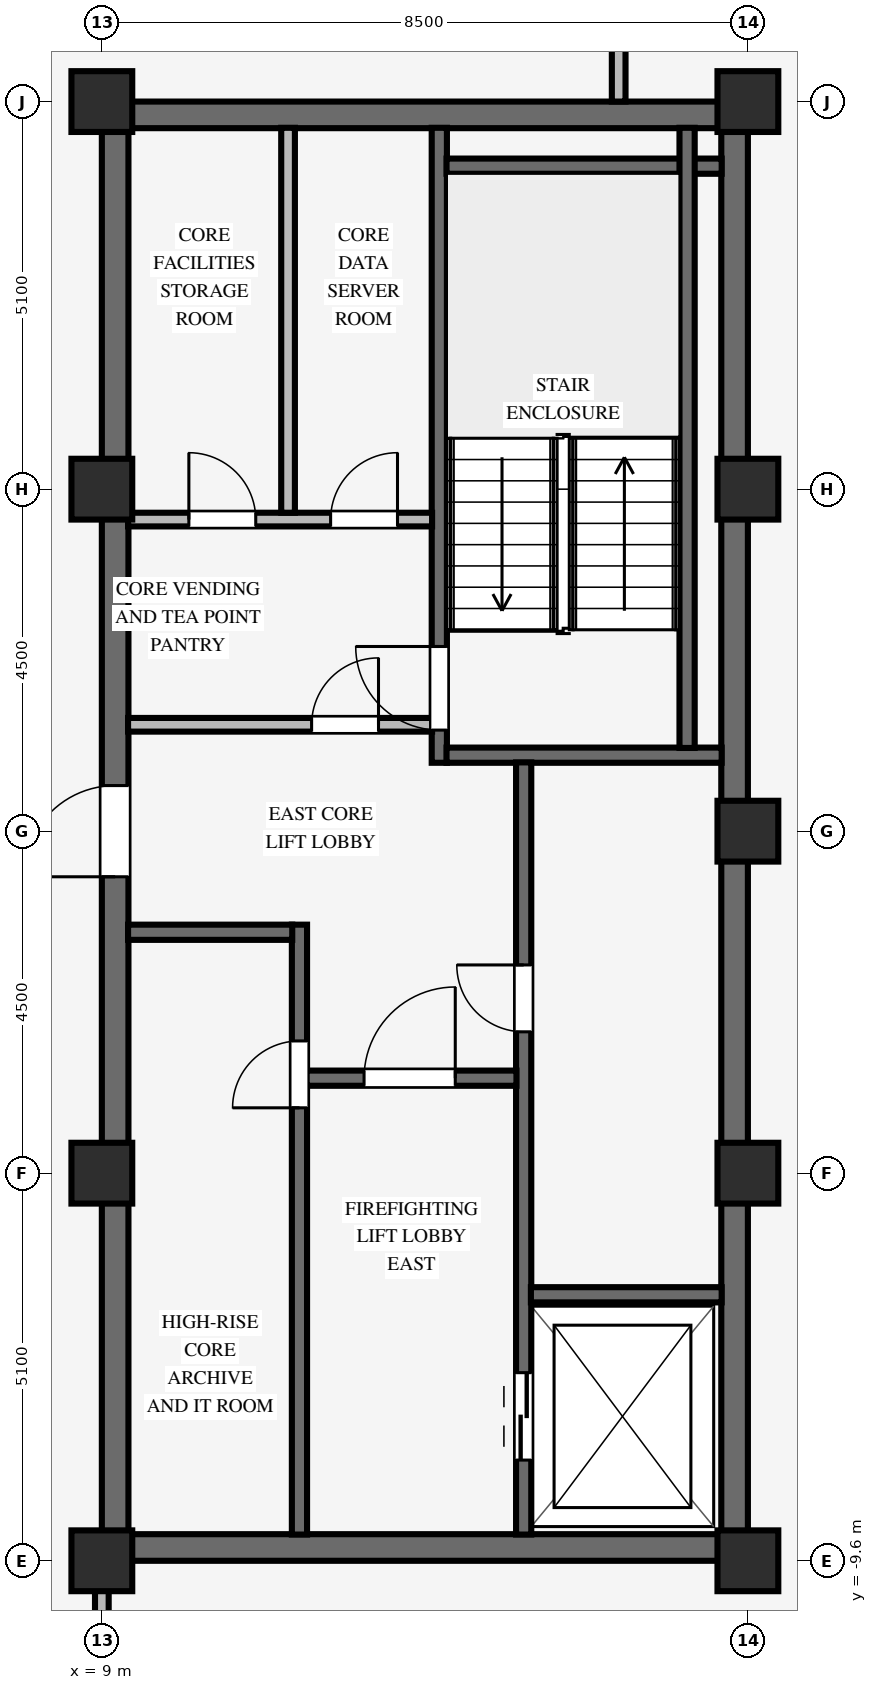
"""IFC4 building model, lengths in metres.
Left out: names, types, materials, properties, quantities, classifications, styles, units other than length and angle.
Written with IfcOpenShell. Run it as: python <this file> out.ifc"""

import sys

from ifc_helpers import new_model, si_unit, direction, frame, frame_2d, origin, origin_2d, place, context, subcontext, project, spatial, rectangle, extrude, source, transform, mapped, element, fill, save


model = new_model("IFC4")
c1 = context("Model", 3, precision=1e-05, world=origin(), true_north=direction((0.0, 1.0)))
c2 = subcontext(c1, "Body", "Model", "MODEL_VIEW")
j1 = project(units=[si_unit("LENGTHUNIT", "METRE"), si_unit("PLANEANGLEUNIT", "RADIAN")], contexts=[c1])
p1 = place(None, origin())
s1 = spatial("IfcSite", under=j1, at=p1, CompositionType="ELEMENT")
p2 = place(p1, origin())
s2 = spatial("IfcBuilding", under=s1, at=p2, CompositionType="ELEMENT")
p3 = place(p2, frame((0.0, 0.0, 283.5)))
s3 = spatial("IfcBuildingStorey", under=s2, at=p3, CompositionType="ELEMENT", Elevation=283.5)
for number, where, z_axis, x_axis in (
    (1, (9.0, -9.425, 0.0), (0.0, 0.0, 1.0), (1.0, 0.0, 0.0)),
    (2, (9.0, 9.425, 0.0), (0.0, 0.0, 1.0), (1.0, 0.0, 0.0)),
):
    element("IfcWall", number, at=place(p3, frame(where, z_axis=z_axis, x_axis=x_axis)), inside=s3, PredefinedType="SHEAR", context=c2, shape_type="SweptSolid", body=[
        extrude(rectangle(XDim=8.5, YDim=0.35, at=frame_2d((4.25, 0.0))), origin(), (0.0, 0.0, 1.0), 3.25),
    ])
p4 = place(p3, frame((9.175, -9.255, 0.0), z_axis=(0.0, 0.0, 1.0), x_axis=(0.0, 1.0, 0.0)))
e3 = element("IfcWall", 3, at=p4, inside=s3, PredefinedType="SHEAR", context=c2, shape_type="SweptSolid", body=[
    extrude(rectangle(XDim=18.51, YDim=0.35, at=frame_2d((9.255, 0.0))), origin(), (0.0, 0.0, 1.0), 3.25),
])
p5 = place(p4, frame((8.655, 0.0, 0.0)))
e4 = element("IfcOpeningElement", 4, at=p5, cuts=e3, PredefinedType="OPENING", context=c2, shape_type="SweptSolid", body=[
    extrude(rectangle(XDim=1.2, YDim=2.15, at=frame_2d((0.6, 1.075))), frame((0.0, 0.185, 0.0), z_axis=(0.0, -1.0, 0.0), x_axis=(1.0, 0.0, 0.0)), (0.0, 0.0, 1.0), 0.37),
])
p6 = place(p3, frame((17.325, -9.255, 0.0), z_axis=(0.0, 0.0, 1.0), x_axis=(0.0, 1.0, 0.0)))
e5 = element("IfcWall", 5, at=p6, inside=s3, PredefinedType="SHEAR", context=c2, shape_type="SweptSolid", body=[
    extrude(rectangle(XDim=18.51, YDim=0.35, at=frame_2d((9.255, 0.0))), origin(), (0.0, 0.0, 1.0), 3.25),
])
for number, where, z_axis, x_axis in (
    (6, (9.0, -9.6, 0.0), (0.0, 0.0, 1.0), (1.0, 0.0, 0.0)),
    (7, (9.0, -4.5, 0.0), (0.0, 0.0, 1.0), (1.0, 0.0, 0.0)),
    (8, (9.0, 4.5, 0.0), (0.0, 0.0, 1.0), (1.0, 0.0, 0.0)),
    (9, (9.0, 9.6, 0.0), (0.0, 0.0, 1.0), (1.0, 0.0, 0.0)),
    (10, (17.5, -9.6, 0.0), (0.0, 0.0, 1.0), (1.0, 0.0, 0.0)),
    (11, (17.5, -4.5, 0.0), (0.0, 0.0, 1.0), (1.0, 0.0, 0.0)),
    (12, (17.5, 4.5, 0.0), (0.0, 0.0, 1.0), (1.0, 0.0, 0.0)),
    (13, (17.5, 9.6, 0.0), (0.0, 0.0, 1.0), (1.0, 0.0, 0.0)),
    (14, (17.5, 0.0, 0.0), (0.0, 0.0, 1.0), (1.0, 0.0, 0.0)),
):
    element("IfcColumn", number, at=place(p3, frame(where, z_axis=z_axis, x_axis=x_axis)), inside=s3, PredefinedType="COLUMN", context=c2, shape_type="SweptSolid", body=[
        extrude(rectangle(XDim=0.8, YDim=0.8, at=origin_2d()), origin(), (0.0, 0.0, 1.0), 3.25),
    ])
p7 = place(p3, frame((13.44, 0.9, 0.0), z_axis=(0.0, 0.0, 1.0), x_axis=(0.0, 1.0, 0.0)))
e15 = element("IfcWall", 15, at=p7, inside=s3, PredefinedType="SHEAR", context=c2, shape_type="SweptSolid", body=[
    extrude(rectangle(XDim=8.355, YDim=0.2, at=frame_2d((4.177, 0.0))), origin(), (0.0, 0.0, 1.0), 3.25),
])
p8 = place(p7, frame((0.43, 0.0, 0.0)))
e16 = element("IfcOpeningElement", 16, at=p8, cuts=e15, PredefinedType="OPENING", context=c2, shape_type="SweptSolid", body=[
    extrude(rectangle(XDim=1.1, YDim=2.15, at=frame_2d((0.55, 1.075))), frame((0.0, 0.11, 0.0), z_axis=(0.0, -1.0, 0.0), x_axis=(1.0, 0.0, 0.0)), (0.0, 0.0, 1.0), 0.22),
])
for number, where, z_axis, x_axis in (
    (17, (13.535, 1.0, 0.0), (0.0, 0.0, 1.0), (1.0, 0.0, 0.0)),
    (18, (13.535, 8.75, 0.0), (0.0, 0.0, 1.0), (1.0, 0.0, 0.0)),
):
    element("IfcWall", number, at=place(p3, frame(where, z_axis=z_axis, x_axis=x_axis)), inside=s3, PredefinedType="SHEAR", context=c2, shape_type="SweptSolid", body=[
        extrude(rectangle(XDim=3.62, YDim=0.2, at=frame_2d((1.81, 0.0))), origin(), (0.0, 0.0, 1.0), 3.25),
    ])
p9 = place(p3, frame((16.7, 1.095, 0.0), z_axis=(0.0, 0.0, 1.0), x_axis=(0.0, 1.0, 0.0)))
e19 = element("IfcWall", 19, at=p9, inside=s3, PredefinedType="SHEAR", context=c2, shape_type="SweptSolid", body=[
    extrude(rectangle(XDim=8.16, YDim=0.2, at=frame_2d((4.08, 0.0))), origin(), (0.0, 0.0, 1.0), 3.25),
])
p10 = place(p3, frame((14.55, -9.255, 0.0), z_axis=(0.0, 0.0, 1.0), x_axis=(0.0, 1.0, 0.0)))
e20 = element("IfcWall", 20, at=p10, inside=s3, PredefinedType="SHEAR", context=c2, shape_type="SweptSolid", body=[
    extrude(rectangle(XDim=10.16, YDim=0.2, at=frame_2d((5.08, 0.0))), origin(), (0.0, 0.0, 1.0), 3.25),
])
p11 = place(p10, frame((6.615, 0.0, 0.0)))
e21 = element("IfcOpeningElement", 21, at=p11, cuts=e20, PredefinedType="OPENING", context=c2, shape_type="SweptSolid", body=[
    extrude(rectangle(XDim=0.88, YDim=2.1, at=frame_2d((0.44, 1.05))), frame((0.0, 0.11, 0.0), z_axis=(0.0, -1.0, 0.0), x_axis=(1.0, 0.0, 0.0)), (0.0, 0.0, 1.0), 0.22),
])
p12 = place(p10, frame((0.98, 0.0, 0.0)))
e22 = element("IfcOpeningElement", 22, at=p12, cuts=e20, PredefinedType="OPENING", context=c2, shape_type="SweptSolid", body=[
    extrude(rectangle(XDim=1.15, YDim=2.15, at=frame_2d((0.575, 1.075))), frame((0.0, 0.11, 0.0), z_axis=(0.0, -1.0, 0.0), x_axis=(1.0, 0.0, 0.0)), (0.0, 0.0, 1.0), 0.22),
])
p13 = place(p3, frame((14.645, -6.1, 0.0), z_axis=(0.0, 0.0, 1.0), x_axis=(1.0, 0.0, 0.0)))
e23 = element("IfcWall", 23, at=p13, inside=s3, PredefinedType="SHEAR", context=c2, shape_type="SweptSolid", body=[
    extrude(rectangle(XDim=2.51, YDim=0.2, at=frame_2d((1.255, 0.0))), origin(), (0.0, 0.0, 1.0), 3.25),
])
p14 = place(p3, frame((11.6, -9.255, 0.0), z_axis=(0.0, 0.0, 1.0), x_axis=(0.0, 1.0, 0.0)))
e24 = element("IfcWall", 24, at=p14, inside=s3, PredefinedType="SHEAR", context=c2, shape_type="SweptSolid", body=[
    extrude(rectangle(XDim=8.025, YDim=0.2, at=frame_2d((4.012, 0.0))), origin(), (0.0, 0.0, 1.0), 3.25),
])
p15 = place(p14, frame((5.615, 0.0, 0.0)))
e25 = element("IfcOpeningElement", 25, at=p15, cuts=e24, PredefinedType="OPENING", context=c2, shape_type="SweptSolid", body=[
    extrude(rectangle(XDim=0.88, YDim=2.1, at=frame_2d((0.44, 1.05))), frame((0.0, 0.11, 0.0), z_axis=(0.0, -1.0, 0.0), x_axis=(1.0, 0.0, 0.0)), (0.0, 0.0, 1.0), 0.22),
])
p16 = place(p3, frame((11.695, -3.25, 0.0), z_axis=(0.0, 0.0, 1.0), x_axis=(1.0, 0.0, 0.0)))
e26 = element("IfcWall", 26, at=p16, inside=s3, PredefinedType="SHEAR", context=c2, shape_type="SweptSolid", body=[
    extrude(rectangle(XDim=2.76, YDim=0.2, at=frame_2d((1.38, 0.0))), origin(), (0.0, 0.0, 1.0), 3.25),
])
p17 = place(p16, frame((0.755, 0.0, 0.0)))
e27 = element("IfcOpeningElement", 27, at=p17, cuts=e26, PredefinedType="OPENING", context=c2, shape_type="SweptSolid", body=[
    extrude(rectangle(XDim=1.2, YDim=2.15, at=frame_2d((0.6, 1.075))), frame((0.0, 0.11, 0.0), z_axis=(0.0, -1.0, 0.0), x_axis=(1.0, 0.0, 0.0)), (0.0, 0.0, 1.0), 0.22),
])
p18 = place(p3, frame((9.345, -1.33, 0.0), z_axis=(0.0, 0.0, 1.0), x_axis=(1.0, 0.0, 0.0)))
e28 = element("IfcWall", 28, at=p18, inside=s3, PredefinedType="SHEAR", context=c2, shape_type="SweptSolid", body=[
    extrude(rectangle(XDim=2.16, YDim=0.2, at=frame_2d((1.08, 0.0))), origin(), (0.0, 0.0, 1.0), 3.25),
])
p19 = place(p3, frame((9.345, 1.4, 0.0), z_axis=(0.0, 0.0, 1.0), x_axis=(1.0, 0.0, 0.0)))
e29 = element("IfcWall", 29, at=p19, inside=s3, PredefinedType="PARTITIONING", context=c2, shape_type="SweptSolid", body=[
    extrude(rectangle(XDim=4.0, YDim=0.18, at=frame_2d((2.0, 0.0))), origin(), (0.0, 0.0, 1.0), 3.24),
])
p20 = place(p19, frame((2.415, 0.0, 0.0)))
e30 = element("IfcOpeningElement", 30, at=p20, cuts=e29, PredefinedType="OPENING", context=c2, shape_type="SweptSolid", body=[
    extrude(rectangle(XDim=0.88, YDim=2.1, at=frame_2d((0.44, 1.05))), frame((0.0, 0.1, 0.0), z_axis=(0.0, -1.0, 0.0), x_axis=(1.0, 0.0, 0.0)), (0.0, 0.0, 1.0), 0.2),
])
p21 = place(p3, frame((9.345, 4.1, 0.0), z_axis=(0.0, 0.0, 1.0), x_axis=(1.0, 0.0, 0.0)))
e31 = element("IfcWall", 31, at=p21, inside=s3, PredefinedType="PARTITIONING", context=c2, shape_type="SweptSolid", body=[
    extrude(rectangle(XDim=4.0, YDim=0.18, at=frame_2d((2.0, 0.0))), origin(), (0.0, 0.0, 1.0), 3.24),
])
p22 = place(p21, frame((0.8, 0.0, 0.0)))
e32 = element("IfcOpeningElement", 32, at=p22, cuts=e31, PredefinedType="OPENING", context=c2, shape_type="SweptSolid", body=[
    extrude(rectangle(XDim=0.88, YDim=2.1, at=frame_2d((0.44, 1.05))), frame((0.0, 0.1, 0.0), z_axis=(0.0, -1.0, 0.0), x_axis=(1.0, 0.0, 0.0)), (0.0, 0.0, 1.0), 0.2),
])
p23 = place(p21, frame((2.665, 0.0, 0.0)))
e33 = element("IfcOpeningElement", 33, at=p23, cuts=e31, PredefinedType="OPENING", context=c2, shape_type="SweptSolid", body=[
    extrude(rectangle(XDim=0.88, YDim=2.1, at=frame_2d((0.44, 1.05))), frame((0.0, 0.1, 0.0), z_axis=(0.0, -1.0, 0.0), x_axis=(1.0, 0.0, 0.0)), (0.0, 0.0, 1.0), 0.2),
])
p24 = place(p3, frame((11.45, 4.19, 0.0), z_axis=(0.0, 0.0, 1.0), x_axis=(0.0, 1.0, 0.0)))
e34 = element("IfcWall", 34, at=p24, inside=s3, PredefinedType="PARTITIONING", context=c2, shape_type="SweptSolid", body=[
    extrude(rectangle(XDim=5.065, YDim=0.18, at=frame_2d((2.532, 0.0))), origin(), (0.0, 0.0, 1.0), 3.24),
])
p25 = place(p3, frame((9.0, -15.314, 0.0), z_axis=(0.0, 0.0, 1.0), x_axis=(0.0, 1.0, 0.0)))
e35 = element("IfcWall", 35, at=p25, inside=s3, PredefinedType="PARTITIONING", context=c2, shape_type="SweptSolid", body=[
    extrude(rectangle(XDim=5.318, YDim=0.18, at=frame_2d((2.659, 0.0))), origin(), (0.0, 0.0, 1.0), 2.772),
])
p26 = place(p25, frame((2.179, 0.0, 0.0)))
e36 = element("IfcOpeningElement", 36, at=p26, cuts=e35, PredefinedType="OPENING", context=c2, shape_type="SweptSolid", body=[
    extrude(rectangle(XDim=0.96, YDim=2.1, at=frame_2d((0.48, 1.05))), frame((0.0, 0.1, 0.0), z_axis=(0.0, -1.0, 0.0), x_axis=(1.0, 0.0, 0.0)), (0.0, 0.0, 1.0), 0.2),
])
p27 = place(p3, frame((15.8, 9.6, 0.0), z_axis=(0.0, 0.0, 1.0), x_axis=(0.0, 1.0, 0.0)))
e37 = element("IfcWall", 37, at=p27, inside=s3, PredefinedType="PARTITIONING", context=c2, shape_type="SweptSolid", body=[
    extrude(rectangle(XDim=2.514, YDim=0.18, at=frame_2d((1.257, 0.0))), origin(), (0.0, 0.0, 1.0), 3.24),
])
m1 = source(origin(), c2, "Body", "SweptSolid", [
    extrude(rectangle(XDim=1.1, YDim=2.15, at=frame_2d((0.55, 1.075))), frame((0.0, 0.025, 0.0), z_axis=(0.0, -1.0, 0.0), x_axis=(1.0, 0.0, 0.0)), (0.0, 0.0, 1.0), 0.05),
])
p28 = place(p8, origin())
e38 = element("IfcDoor", 38, at=p28, inside=s3, OperationType="SINGLE_SWING_RIGHT", PredefinedType="DOOR", context=c2, shape_type="MappedRepresentation", body=[
    mapped(m1, transform((0.0, 0.0, 0.0), scale=1.0)),
])
fill(e16, e38)
m2 = source(origin(), c2, "Body", "SweptSolid", [
    extrude(rectangle(XDim=0.88, YDim=2.1, at=frame_2d((0.44, 1.05))), frame((0.0, 0.025, 0.0), z_axis=(0.0, -1.0, 0.0), x_axis=(1.0, 0.0, 0.0)), (0.0, 0.0, 1.0), 0.05),
])
p29 = place(p11, origin())
e39 = element("IfcDoor", 39, at=p29, inside=s3, OperationType="SINGLE_SWING_RIGHT", PredefinedType="DOOR", context=c2, shape_type="MappedRepresentation", body=[
    mapped(m2, transform((0.0, 0.0, 0.0), scale=1.0)),
])
fill(e21, e39)
m3 = source(origin(), c2, "Body", "SweptSolid", [
    extrude(rectangle(XDim=1.2, YDim=2.15, at=frame_2d((0.6, 1.075))), frame((0.0, 0.025, 0.0), z_axis=(0.0, -1.0, 0.0), x_axis=(1.0, 0.0, 0.0)), (0.0, 0.0, 1.0), 0.05),
])
p30 = place(p17, origin())
e40 = element("IfcDoor", 40, at=p30, inside=s3, OperationType="SINGLE_SWING_RIGHT", PredefinedType="DOOR", context=c2, shape_type="MappedRepresentation", body=[
    mapped(m3, transform((0.0, 0.0, 0.0), scale=1.0)),
])
fill(e27, e40)
p31 = place(p15, origin())
e41 = element("IfcDoor", 41, at=p31, inside=s3, OperationType="SINGLE_SWING_LEFT", PredefinedType="DOOR", context=c2, shape_type="MappedRepresentation", body=[
    mapped(m2, transform((0.0, 0.0, 0.0), scale=1.0)),
])
fill(e25, e41)
p32 = place(p5, origin())
e42 = element("IfcDoor", 42, at=p32, inside=s3, OperationType="SINGLE_SWING_LEFT", PredefinedType="DOOR", context=c2, shape_type="MappedRepresentation", body=[
    mapped(m3, transform((0.0, 0.0, 0.0), scale=1.0)),
])
fill(e4, e42)
p33 = place(p20, origin())
e43 = element("IfcDoor", 43, at=p33, inside=s3, OperationType="SINGLE_SWING_RIGHT", PredefinedType="DOOR", context=c2, shape_type="MappedRepresentation", body=[
    mapped(m2, transform((0.0, 0.0, 0.0), scale=1.0)),
])
fill(e30, e43)
p34 = place(p22, origin())
e44 = element("IfcDoor", 44, at=p34, inside=s3, OperationType="SINGLE_SWING_LEFT", PredefinedType="DOOR", context=c2, shape_type="MappedRepresentation", body=[
    mapped(m2, transform((0.0, 0.0, 0.0), scale=1.0)),
])
fill(e32, e44)
p35 = place(p23, origin())
e45 = element("IfcDoor", 45, at=p35, inside=s3, OperationType="SINGLE_SWING_RIGHT", PredefinedType="DOOR", context=c2, shape_type="MappedRepresentation", body=[
    mapped(m2, transform((0.0, 0.0, 0.0), scale=1.0)),
])
fill(e33, e45)
m4 = source(origin(), c2, "Body", "SweptSolid", [
    extrude(rectangle(XDim=1.15, YDim=2.15, at=frame_2d((0.575, 1.075))), frame((0.0, 0.025, 0.0), z_axis=(0.0, -1.0, 0.0), x_axis=(1.0, 0.0, 0.0)), (0.0, 0.0, 1.0), 0.05),
])
p36 = place(p12, origin())
e46 = element("IfcDoor", 46, at=p36, inside=s3, OperationType="DOUBLE_DOOR_SLIDING", PredefinedType="DOOR", context=c2, shape_type="MappedRepresentation", body=[
    mapped(m4, transform((0.0, 0.0, 0.0), scale=1.0)),
])
fill(e22, e46)
save(model, sys.argv[1])
